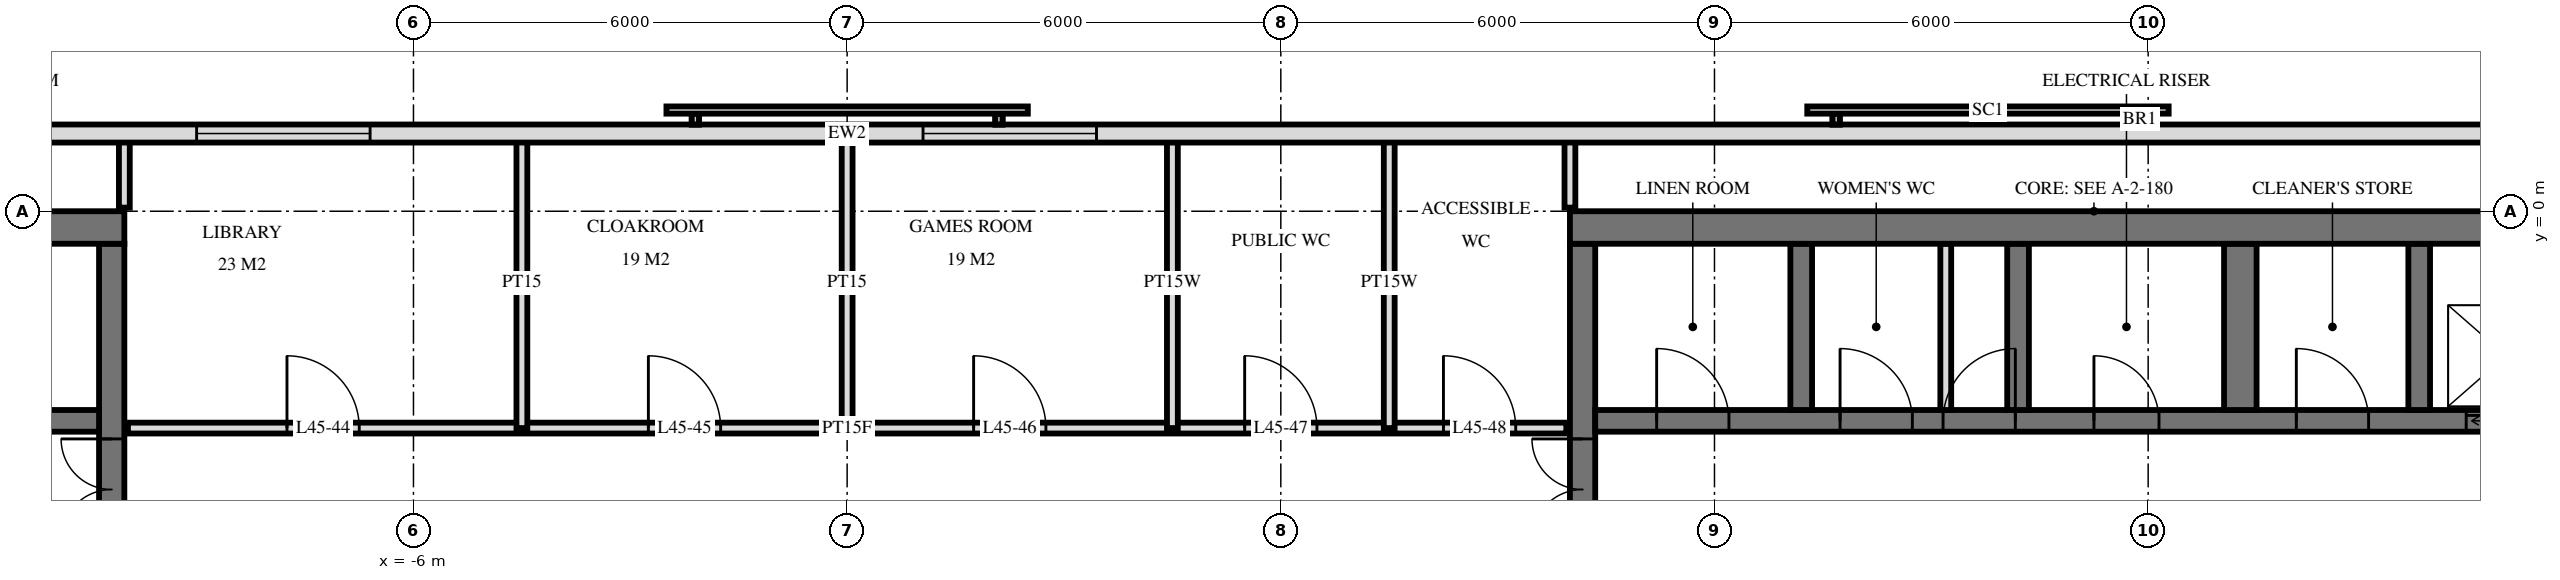
"""IFC4 building model, lengths in metres.
Left out: names, types, materials, properties, quantities, classifications, styles, units other than length and angle.
Written with IfcOpenShell. Run it as: python <this file> out.ifc"""

import sys

from ifc_helpers import new_model, si_unit, direction, frame, frame_2d, origin, place, context, subcontext, project, spatial, rectangle, extrude, element, fill, save


model = new_model("IFC4")
c1 = context("Model", 3, precision=1e-05, world=origin(), true_north=direction((0.0, 1.0)))
c2 = subcontext(c1, "Body", "Model", "MODEL_VIEW")
j1 = project(units=[si_unit("LENGTHUNIT", "METRE"), si_unit("PLANEANGLEUNIT", "RADIAN")], contexts=[c1])
p1 = place(None, origin())
s1 = spatial("IfcSite", under=j1, at=p1, CompositionType="ELEMENT")
p2 = place(p1, origin())
s2 = spatial("IfcBuilding", under=s1, at=p2, CompositionType="ELEMENT")
p3 = place(p2, frame((0.0, 0.0, 174.0)))
s3 = spatial("IfcBuildingStorey", under=s2, at=p3, CompositionType="ELEMENT", Elevation=174.0)
p4 = place(p3, frame((-24.5, -0.225, 0.0), z_axis=(0.0, 0.0, 1.0), x_axis=(1.0, 0.0, 0.0)))
e1 = element("IfcWall", 1, at=p4, inside=s3, PredefinedType="SHEAR", context=c2, shape_type="SweptSolid", body=[
    extrude(rectangle(XDim=14.5, YDim=0.45, at=frame_2d((7.25, 0.0))), origin(), (0.0, 0.0, 1.0), 3.6),
])
p5 = place(p3, frame((-10.175, -14.55, 0.0), z_axis=(0.0, 0.0, 1.0), x_axis=(0.0, 1.0, 0.0)))
e2 = element("IfcWall", 2, at=p5, inside=s3, PredefinedType="SHEAR", context=c2, shape_type="SweptSolid", body=[
    extrude(rectangle(XDim=14.1, YDim=0.35, at=frame_2d((7.05, 0.0))), origin(), (0.0, 0.0, 1.0), 3.6),
])
p6 = place(p5, frame((8.4, 0.0, 0.0)))
e3 = element("IfcOpeningElement", 3, at=p6, cuts=e2, PredefinedType="OPENING", context=c2, shape_type="SweptSolid", body=[
    extrude(rectangle(XDim=1.4, YDim=2.4, at=frame_2d((0.7, 1.2))), frame((0.0, 0.185, 0.0), z_axis=(0.0, -1.0, 0.0), x_axis=(1.0, 0.0, 0.0)), (0.0, 0.0, 1.0), 0.37),
])
p7 = place(p5, frame((10.0, 0.0, 0.0)))
e4 = element("IfcOpeningElement", 4, at=p7, cuts=e2, PredefinedType="OPENING", context=c2, shape_type="SweptSolid", body=[
    extrude(rectangle(XDim=1.4, YDim=2.4, at=frame_2d((0.7, 1.2))), frame((0.0, 0.185, 0.0), z_axis=(0.0, -1.0, 0.0), x_axis=(1.0, 0.0, 0.0)), (0.0, 0.0, 1.0), 0.37),
])
p8 = place(p5, frame((4.0, 0.0, 0.0)))
e5 = element("IfcOpeningElement", 5, at=p8, cuts=e2, PredefinedType="OPENING", context=c2, shape_type="SweptSolid", body=[
    extrude(rectangle(XDim=1.2, YDim=2.1, at=frame_2d((0.6, 1.05))), frame((0.0, 0.185, 0.0), z_axis=(0.0, -1.0, 0.0), x_axis=(1.0, 0.0, 0.0)), (0.0, 0.0, 1.0), 0.37),
])
p9 = place(p3, frame((-24.05, -2.9, 0.0), z_axis=(0.0, 0.0, 1.0), x_axis=(1.0, 0.0, 0.0)))
e6 = element("IfcWall", 6, at=p9, inside=s3, PredefinedType="SHEAR", context=c2, shape_type="SweptSolid", body=[
    extrude(rectangle(XDim=13.7, YDim=0.3, at=frame_2d((6.85, 0.0))), origin(), (0.0, 0.0, 1.0), 3.6),
])
p10 = place(p9, frame((0.55, 0.0, 0.0)))
e7 = element("IfcOpeningElement", 7, at=p10, cuts=e6, PredefinedType="OPENING", context=c2, shape_type="SweptSolid", body=[
    extrude(rectangle(XDim=1.1, YDim=2.1, at=frame_2d((0.55, 1.05))), frame((0.0, 0.16, 0.0), z_axis=(0.0, -1.0, 0.0), x_axis=(1.0, 0.0, 0.0)), (0.0, 0.0, 1.0), 0.32),
])
p11 = place(p9, frame((5.9, 0.0, 0.0)))
e8 = element("IfcOpeningElement", 8, at=p11, cuts=e6, PredefinedType="OPENING", context=c2, shape_type="SweptSolid", body=[
    extrude(rectangle(XDim=0.9, YDim=2.1, at=frame_2d((0.45, 1.05))), frame((0.0, 0.16, 0.0), z_axis=(0.0, -1.0, 0.0), x_axis=(1.0, 0.0, 0.0)), (0.0, 0.0, 1.0), 0.32),
])
p12 = place(p9, frame((11.85, 0.0, 0.0)))
e9 = element("IfcOpeningElement", 9, at=p12, cuts=e6, PredefinedType="OPENING", context=c2, shape_type="SweptSolid", body=[
    extrude(rectangle(XDim=1.0, YDim=2.1, at=frame_2d((0.5, 1.05))), frame((0.0, 0.16, 0.0), z_axis=(0.0, -1.0, 0.0), x_axis=(1.0, 0.0, 0.0)), (0.0, 0.0, 1.0), 0.32),
])
p13 = place(p9, frame((9.312, 0.0, 0.0)))
e10 = element("IfcOpeningElement", 10, at=p13, cuts=e6, PredefinedType="OPENING", context=c2, shape_type="SweptSolid", body=[
    extrude(rectangle(XDim=1.0, YDim=2.1, at=frame_2d((0.5, 1.05))), frame((0.0, 0.16, 0.0), z_axis=(0.0, -1.0, 0.0), x_axis=(1.0, 0.0, 0.0)), (0.0, 0.0, 1.0), 0.32),
])
p14 = place(p9, frame((7.887, 0.0, 0.0)))
e11 = element("IfcOpeningElement", 11, at=p14, cuts=e6, PredefinedType="OPENING", context=c2, shape_type="SweptSolid", body=[
    extrude(rectangle(XDim=1.0, YDim=2.1, at=frame_2d((0.5, 1.05))), frame((0.0, 0.16, 0.0), z_axis=(0.0, -1.0, 0.0), x_axis=(1.0, 0.0, 0.0)), (0.0, 0.0, 1.0), 0.32),
])
p15 = place(p9, frame((3.0, 0.0, 0.0)))
e12 = element("IfcOpeningElement", 12, at=p15, cuts=e6, PredefinedType="OPENING", context=c2, shape_type="SweptSolid", body=[
    extrude(rectangle(XDim=1.0, YDim=2.1, at=frame_2d((0.5, 1.05))), frame((0.0, 0.16, 0.0), z_axis=(0.0, -1.0, 0.0), x_axis=(1.0, 0.0, 0.0)), (0.0, 0.0, 1.0), 0.32),
])
p16 = place(p3, frame((10.0, -0.225, 0.0), z_axis=(0.0, 0.0, 1.0), x_axis=(1.0, 0.0, 0.0)))
e13 = element("IfcWall", 13, at=p16, inside=s3, PredefinedType="SHEAR", context=c2, shape_type="SweptSolid", body=[
    extrude(rectangle(XDim=14.5, YDim=0.45, at=frame_2d((7.25, 0.0))), origin(), (0.0, 0.0, 1.0), 3.6),
])
p17 = place(p3, frame((10.175, -14.55, 0.0), z_axis=(0.0, 0.0, 1.0), x_axis=(0.0, 1.0, 0.0)))
e14 = element("IfcWall", 14, at=p17, inside=s3, PredefinedType="SHEAR", context=c2, shape_type="SweptSolid", body=[
    extrude(rectangle(XDim=14.1, YDim=0.35, at=frame_2d((7.05, 0.0))), origin(), (0.0, 0.0, 1.0), 3.6),
])
p18 = place(p17, frame((8.4, 0.0, 0.0)))
e15 = element("IfcOpeningElement", 15, at=p18, cuts=e14, PredefinedType="OPENING", context=c2, shape_type="SweptSolid", body=[
    extrude(rectangle(XDim=1.4, YDim=2.4, at=frame_2d((0.7, 1.2))), frame((0.0, 0.185, 0.0), z_axis=(0.0, -1.0, 0.0), x_axis=(1.0, 0.0, 0.0)), (0.0, 0.0, 1.0), 0.37),
])
p19 = place(p17, frame((10.0, 0.0, 0.0)))
e16 = element("IfcOpeningElement", 16, at=p19, cuts=e14, PredefinedType="OPENING", context=c2, shape_type="SweptSolid", body=[
    extrude(rectangle(XDim=1.4, YDim=2.4, at=frame_2d((0.7, 1.2))), frame((0.0, 0.185, 0.0), z_axis=(0.0, -1.0, 0.0), x_axis=(1.0, 0.0, 0.0)), (0.0, 0.0, 1.0), 0.37),
])
p20 = place(p17, frame((4.0, 0.0, 0.0)))
e17 = element("IfcOpeningElement", 17, at=p20, cuts=e14, PredefinedType="OPENING", context=c2, shape_type="SweptSolid", body=[
    extrude(rectangle(XDim=1.2, YDim=2.1, at=frame_2d((0.6, 1.05))), frame((0.0, 0.185, 0.0), z_axis=(0.0, -1.0, 0.0), x_axis=(1.0, 0.0, 0.0)), (0.0, 0.0, 1.0), 0.37),
])
p21 = place(p3, frame((10.35, -2.9, 0.0), z_axis=(0.0, 0.0, 1.0), x_axis=(1.0, 0.0, 0.0)))
e18 = element("IfcWall", 18, at=p21, inside=s3, PredefinedType="SHEAR", context=c2, shape_type="SweptSolid", body=[
    extrude(rectangle(XDim=13.7, YDim=0.3, at=frame_2d((6.85, 0.0))), origin(), (0.0, 0.0, 1.0), 3.6),
])
p22 = place(p21, frame((12.05, 0.0, 0.0)))
e19 = element("IfcOpeningElement", 19, at=p22, cuts=e18, PredefinedType="OPENING", context=c2, shape_type="SweptSolid", body=[
    extrude(rectangle(XDim=1.1, YDim=2.1, at=frame_2d((0.55, 1.05))), frame((0.0, 0.16, 0.0), z_axis=(0.0, -1.0, 0.0), x_axis=(1.0, 0.0, 0.0)), (0.0, 0.0, 1.0), 0.32),
])
p23 = place(p21, frame((6.9, 0.0, 0.0)))
e20 = element("IfcOpeningElement", 20, at=p23, cuts=e18, PredefinedType="OPENING", context=c2, shape_type="SweptSolid", body=[
    extrude(rectangle(XDim=0.9, YDim=2.1, at=frame_2d((0.45, 1.05))), frame((0.0, 0.16, 0.0), z_axis=(0.0, -1.0, 0.0), x_axis=(1.0, 0.0, 0.0)), (0.0, 0.0, 1.0), 0.32),
])
p24 = place(p21, frame((0.85, 0.0, 0.0)))
e21 = element("IfcOpeningElement", 21, at=p24, cuts=e18, PredefinedType="OPENING", context=c2, shape_type="SweptSolid", body=[
    extrude(rectangle(XDim=1.0, YDim=2.1, at=frame_2d((0.5, 1.05))), frame((0.0, 0.16, 0.0), z_axis=(0.0, -1.0, 0.0), x_axis=(1.0, 0.0, 0.0)), (0.0, 0.0, 1.0), 0.32),
])
p25 = place(p21, frame((3.387, 0.0, 0.0)))
e22 = element("IfcOpeningElement", 22, at=p25, cuts=e18, PredefinedType="OPENING", context=c2, shape_type="SweptSolid", body=[
    extrude(rectangle(XDim=1.0, YDim=2.1, at=frame_2d((0.5, 1.05))), frame((0.0, 0.16, 0.0), z_axis=(0.0, -1.0, 0.0), x_axis=(1.0, 0.0, 0.0)), (0.0, 0.0, 1.0), 0.32),
])
p26 = place(p21, frame((4.812, 0.0, 0.0)))
e23 = element("IfcOpeningElement", 23, at=p26, cuts=e18, PredefinedType="OPENING", context=c2, shape_type="SweptSolid", body=[
    extrude(rectangle(XDim=1.0, YDim=2.1, at=frame_2d((0.5, 1.05))), frame((0.0, 0.16, 0.0), z_axis=(0.0, -1.0, 0.0), x_axis=(1.0, 0.0, 0.0)), (0.0, 0.0, 1.0), 0.32),
])
p27 = place(p21, frame((9.7, 0.0, 0.0)))
e24 = element("IfcOpeningElement", 24, at=p27, cuts=e18, PredefinedType="OPENING", context=c2, shape_type="SweptSolid", body=[
    extrude(rectangle(XDim=1.0, YDim=2.1, at=frame_2d((0.5, 1.05))), frame((0.0, 0.16, 0.0), z_axis=(0.0, -1.0, 0.0), x_axis=(1.0, 0.0, 0.0)), (0.0, 0.0, 1.0), 0.32),
])
for number, where, z_axis, x_axis in (
    (25, (13.2, -2.75, 0.0), (0.0, 0.0, 1.0), (0.0, 1.0, 0.0)),
    (26, (16.2, -2.75, 0.0), (0.0, 0.0, 1.0), (0.0, 1.0, 0.0)),
):
    element("IfcWall", number, at=place(p3, frame(where, z_axis=z_axis, x_axis=x_axis)), inside=s3, PredefinedType="SHEAR", context=c2, shape_type="SweptSolid", body=[
        extrude(rectangle(XDim=2.3, YDim=0.3, at=frame_2d((1.15, 0.0))), origin(), (0.0, 0.0, 1.0), 3.6),
    ])
p28 = place(p3, frame((19.275, -2.75, 0.0), z_axis=(0.0, 0.0, 1.0), x_axis=(0.0, 1.0, 0.0)))
e27 = element("IfcWall", 27, at=p28, inside=s3, PredefinedType="SHEAR", context=c2, shape_type="SweptSolid", body=[
    extrude(rectangle(XDim=2.3, YDim=0.45, at=frame_2d((1.15, 0.0))), origin(), (0.0, 0.0, 1.0), 3.6),
])
p29 = place(p3, frame((21.75, -2.75, 0.0), z_axis=(0.0, 0.0, 1.0), x_axis=(0.0, 1.0, 0.0)))
e28 = element("IfcWall", 28, at=p29, inside=s3, PredefinedType="SHEAR", context=c2, shape_type="SweptSolid", body=[
    extrude(rectangle(XDim=2.3, YDim=0.3, at=frame_2d((1.15, 0.0))), origin(), (0.0, 0.0, 1.0), 3.6),
])
p30 = place(p3, frame((23.675, 1.075, 0.0), z_axis=(0.0, 0.0, 1.0), x_axis=(-1.0, 0.0, 0.0)))
e29 = element("IfcWall", 29, at=p30, inside=s3, PredefinedType="SOLIDWALL", context=c2, shape_type="SweptSolid", body=[
    extrude(rectangle(XDim=47.351, YDim=0.25, at=frame_2d((23.675, 0.0))), origin(), (0.0, 0.0, 1.0), 3.3),
])
p31 = place(p30, frame((20.225, 0.0, 0.3)))
e30 = element("IfcOpeningElement", 30, at=p31, cuts=e29, PredefinedType="OPENING", context=c2, shape_type="SweptSolid", body=[
    extrude(rectangle(XDim=2.4, YDim=2.1, at=frame_2d((1.2, 1.05))), frame((0.0, 0.135, 0.0), z_axis=(0.0, -1.0, 0.0), x_axis=(1.0, 0.0, 0.0)), (0.0, 0.0, 1.0), 0.27),
])
p32 = place(p30, frame((30.275, 0.0, 0.3)))
e31 = element("IfcOpeningElement", 31, at=p32, cuts=e29, PredefinedType="OPENING", context=c2, shape_type="SweptSolid", body=[
    extrude(rectangle(XDim=2.4, YDim=2.1, at=frame_2d((1.2, 1.05))), frame((0.0, 0.135, 0.0), z_axis=(0.0, -1.0, 0.0), x_axis=(1.0, 0.0, 0.0)), (0.0, 0.0, 1.0), 0.27),
])
p33 = place(p3, frame((15.2, -2.75, 0.0), z_axis=(0.0, 0.0, 1.0), x_axis=(0.0, 1.0, 0.0)))
e32 = element("IfcWall", 32, at=p33, inside=s3, PredefinedType="PARTITIONING", context=c2, shape_type="SweptSolid", body=[
    extrude(rectangle(XDim=2.3, YDim=0.15, at=frame_2d((1.15, 0.0))), origin(), (0.0, 0.0, 1.0), 3.3),
])
p34 = place(p3, frame((10.0, 0.05, 0.0), z_axis=(0.0, 0.0, 1.0), x_axis=(0.0, 1.0, 0.0)))
e33 = element("IfcWall", 33, at=p34, inside=s3, PredefinedType="PLUMBINGWALL", context=c2, shape_type="SweptSolid", body=[
    extrude(rectangle(XDim=0.97, YDim=0.15, at=frame_2d((0.485, 0.0))), origin(), (0.0, 0.0, 1.0), 3.32),
])
for number, where, z_axis, x_axis in (
    (34, (7.5, -3.0, 0.0), (0.0, 0.0, 1.0), (0.0, 1.0, 0.0)),
    (35, (4.5, -3.0, 0.0), (0.0, 0.0, 1.0), (0.0, 1.0, 0.0)),
):
    element("IfcWall", number, at=place(p3, frame(where, z_axis=z_axis, x_axis=x_axis)), inside=s3, PredefinedType="PLUMBINGWALL", context=c2, shape_type="SweptSolid", body=[
        extrude(rectangle(XDim=4.02, YDim=0.15, at=frame_2d((2.01, 0.0))), origin(), (0.0, 0.0, 1.0), 3.32),
    ])
for number, where, z_axis, x_axis in (
    (36, (0.0, -3.0, 0.0), (0.0, 0.0, 1.0), (0.0, 1.0, 0.0)),
    (37, (-4.5, -3.0, 0.0), (0.0, 0.0, 1.0), (0.0, 1.0, 0.0)),
):
    element("IfcWall", number, at=place(p3, frame(where, z_axis=z_axis, x_axis=x_axis)), inside=s3, PredefinedType="PARTITIONING", context=c2, shape_type="SweptSolid", body=[
        extrude(rectangle(XDim=4.02, YDim=0.15, at=frame_2d((2.01, 0.0))), origin(), (0.0, 0.0, 1.0), 3.32),
    ])
p35 = place(p3, frame((-10.0, 0.05, 0.0), z_axis=(0.0, 0.0, 1.0), x_axis=(0.0, 1.0, 0.0)))
e38 = element("IfcWall", 38, at=p35, inside=s3, PredefinedType="PARTITIONING", context=c2, shape_type="SweptSolid", body=[
    extrude(rectangle(XDim=0.97, YDim=0.15, at=frame_2d((0.485, 0.0))), origin(), (0.0, 0.0, 1.0), 3.32),
])
p36 = place(p3, frame((-9.95, -3.0, 0.0), z_axis=(0.0, 0.0, 1.0), x_axis=(1.0, 0.0, 0.0)))
e39 = element("IfcWall", 39, at=p36, inside=s3, PredefinedType="PARTITIONING", context=c2, shape_type="SweptSolid", body=[
    extrude(rectangle(XDim=19.9, YDim=0.15, at=frame_2d((9.95, 0.0))), origin(), (0.0, 0.0, 1.0), 3.32),
])
p37 = place(p36, frame((2.2, 0.0, 0.0)))
e40 = element("IfcOpeningElement", 40, at=p37, cuts=e39, PredefinedType="OPENING", context=c2, shape_type="SweptSolid", body=[
    extrude(rectangle(XDim=1.0, YDim=2.1, at=frame_2d((0.5, 1.05))), frame((0.0, 0.085, 0.0), z_axis=(0.0, -1.0, 0.0), x_axis=(1.0, 0.0, 0.0)), (0.0, 0.0, 1.0), 0.17),
])
p38 = place(p36, frame((7.2, 0.0, 0.0)))
e41 = element("IfcOpeningElement", 41, at=p38, cuts=e39, PredefinedType="OPENING", context=c2, shape_type="SweptSolid", body=[
    extrude(rectangle(XDim=1.0, YDim=2.1, at=frame_2d((0.5, 1.05))), frame((0.0, 0.085, 0.0), z_axis=(0.0, -1.0, 0.0), x_axis=(1.0, 0.0, 0.0)), (0.0, 0.0, 1.0), 0.17),
])
p39 = place(p36, frame((11.7, 0.0, 0.0)))
e42 = element("IfcOpeningElement", 42, at=p39, cuts=e39, PredefinedType="OPENING", context=c2, shape_type="SweptSolid", body=[
    extrude(rectangle(XDim=1.0, YDim=2.1, at=frame_2d((0.5, 1.05))), frame((0.0, 0.085, 0.0), z_axis=(0.0, -1.0, 0.0), x_axis=(1.0, 0.0, 0.0)), (0.0, 0.0, 1.0), 0.17),
])
p40 = place(p36, frame((15.45, 0.0, 0.0)))
e43 = element("IfcOpeningElement", 43, at=p40, cuts=e39, PredefinedType="OPENING", context=c2, shape_type="SweptSolid", body=[
    extrude(rectangle(XDim=1.0, YDim=2.1, at=frame_2d((0.5, 1.05))), frame((0.0, 0.085, 0.0), z_axis=(0.0, -1.0, 0.0), x_axis=(1.0, 0.0, 0.0)), (0.0, 0.0, 1.0), 0.17),
])
p41 = place(p36, frame((18.2, 0.0, 0.0)))
e44 = element("IfcOpeningElement", 44, at=p41, cuts=e39, PredefinedType="OPENING", context=c2, shape_type="SweptSolid", body=[
    extrude(rectangle(XDim=1.0, YDim=2.1, at=frame_2d((0.5, 1.05))), frame((0.0, 0.085, 0.0), z_axis=(0.0, -1.0, 0.0), x_axis=(1.0, 0.0, 0.0)), (0.0, 0.0, 1.0), 0.17),
])
p42 = place(p31, origin())
e45 = element("IfcWindow", 45, at=p42, inside=s3, PartitioningType="SINGLE_PANEL", PredefinedType="WINDOW", context=c2, shape_type="SweptSolid", body=[
    extrude(rectangle(XDim=2.4, YDim=2.1, at=frame_2d((1.2, 1.05))), frame((0.0, 0.03, 0.0), z_axis=(0.0, -1.0, 0.0), x_axis=(1.0, 0.0, 0.0)), (0.0, 0.0, 1.0), 0.06),
])
fill(e30, e45)
p43 = place(p32, origin())
e46 = element("IfcWindow", 46, at=p43, inside=s3, PartitioningType="SINGLE_PANEL", PredefinedType="WINDOW", context=c2, shape_type="SweptSolid", body=[
    extrude(rectangle(XDim=2.4, YDim=2.1, at=frame_2d((1.2, 1.05))), frame((0.0, 0.03, 0.0), z_axis=(0.0, -1.0, 0.0), x_axis=(1.0, 0.0, 0.0)), (0.0, 0.0, 1.0), 0.06),
])
fill(e31, e46)
p44 = place(p22, origin())
e47 = element("IfcDoor", 47, at=p44, inside=s3, OperationType="DOUBLE_DOOR_SLIDING", PredefinedType="USERDEFINED", context=c2, shape_type="SweptSolid", body=[
    extrude(rectangle(XDim=1.1, YDim=2.1, at=frame_2d((0.55, 1.05))), frame((0.0, 0.025, 0.0), z_axis=(0.0, -1.0, 0.0), x_axis=(1.0, 0.0, 0.0)), (0.0, 0.0, 1.0), 0.05),
])
fill(e19, e47)
p45 = place(p7, origin())
e48 = element("IfcDoor", 48, at=p45, inside=s3, OperationType="DOUBLE_DOOR_SINGLE_SWING", PredefinedType="DOOR", context=c2, shape_type="SweptSolid", body=[
    extrude(rectangle(XDim=1.4, YDim=2.4, at=frame_2d((0.7, 1.2))), frame((0.0, 0.025, 0.0), z_axis=(0.0, -1.0, 0.0), x_axis=(1.0, 0.0, 0.0)), (0.0, 0.0, 1.0), 0.05),
])
fill(e4, e48)
p46 = place(p19, origin())
e49 = element("IfcDoor", 49, at=p46, inside=s3, OperationType="DOUBLE_DOOR_SINGLE_SWING", PredefinedType="DOOR", context=c2, shape_type="SweptSolid", body=[
    extrude(rectangle(XDim=1.4, YDim=2.4, at=frame_2d((0.7, 1.2))), frame((0.0, 0.025, 0.0), z_axis=(0.0, -1.0, 0.0), x_axis=(1.0, 0.0, 0.0)), (0.0, 0.0, 1.0), 0.05),
])
fill(e16, e49)
p47 = place(p23, origin())
e50 = element("IfcDoor", 50, at=p47, inside=s3, OperationType="SINGLE_SWING_RIGHT", PredefinedType="DOOR", context=c2, shape_type="SweptSolid", body=[
    extrude(rectangle(XDim=0.9, YDim=2.1, at=frame_2d((0.45, 1.05))), frame((0.0, 0.025, 0.0), z_axis=(0.0, -1.0, 0.0), x_axis=(1.0, 0.0, 0.0)), (0.0, 0.0, 1.0), 0.05),
])
fill(e20, e50)
p48 = place(p24, origin())
e51 = element("IfcDoor", 51, at=p48, inside=s3, OperationType="SINGLE_SWING_RIGHT", PredefinedType="DOOR", context=c2, shape_type="SweptSolid", body=[
    extrude(rectangle(XDim=1.0, YDim=2.1, at=frame_2d((0.5, 1.05))), frame((0.0, 0.025, 0.0), z_axis=(0.0, -1.0, 0.0), x_axis=(1.0, 0.0, 0.0)), (0.0, 0.0, 1.0), 0.05),
])
fill(e21, e51)
p49 = place(p25, origin())
e52 = element("IfcDoor", 52, at=p49, inside=s3, OperationType="SINGLE_SWING_RIGHT", PredefinedType="DOOR", context=c2, shape_type="SweptSolid", body=[
    extrude(rectangle(XDim=1.0, YDim=2.1, at=frame_2d((0.5, 1.05))), frame((0.0, 0.025, 0.0), z_axis=(0.0, -1.0, 0.0), x_axis=(1.0, 0.0, 0.0)), (0.0, 0.0, 1.0), 0.05),
])
fill(e22, e52)
p50 = place(p26, origin())
e53 = element("IfcDoor", 53, at=p50, inside=s3, OperationType="SINGLE_SWING_LEFT", PredefinedType="DOOR", context=c2, shape_type="SweptSolid", body=[
    extrude(rectangle(XDim=1.0, YDim=2.1, at=frame_2d((0.5, 1.05))), frame((0.0, 0.025, 0.0), z_axis=(0.0, -1.0, 0.0), x_axis=(1.0, 0.0, 0.0)), (0.0, 0.0, 1.0), 0.05),
])
fill(e23, e53)
p51 = place(p27, origin())
e54 = element("IfcDoor", 54, at=p51, inside=s3, OperationType="SINGLE_SWING_RIGHT", PredefinedType="DOOR", context=c2, shape_type="SweptSolid", body=[
    extrude(rectangle(XDim=1.0, YDim=2.1, at=frame_2d((0.5, 1.05))), frame((0.0, 0.025, 0.0), z_axis=(0.0, -1.0, 0.0), x_axis=(1.0, 0.0, 0.0)), (0.0, 0.0, 1.0), 0.05),
])
fill(e24, e54)
p52 = place(p37, origin())
e55 = element("IfcDoor", 55, at=p52, inside=s3, OperationType="SINGLE_SWING_RIGHT", PredefinedType="DOOR", context=c2, shape_type="SweptSolid", body=[
    extrude(rectangle(XDim=1.0, YDim=2.1, at=frame_2d((0.5, 1.05))), frame((0.0, 0.025, 0.0), z_axis=(0.0, -1.0, 0.0), x_axis=(1.0, 0.0, 0.0)), (0.0, 0.0, 1.0), 0.05),
])
fill(e40, e55)
p53 = place(p38, origin())
e56 = element("IfcDoor", 56, at=p53, inside=s3, OperationType="SINGLE_SWING_RIGHT", PredefinedType="DOOR", context=c2, shape_type="SweptSolid", body=[
    extrude(rectangle(XDim=1.0, YDim=2.1, at=frame_2d((0.5, 1.05))), frame((0.0, 0.025, 0.0), z_axis=(0.0, -1.0, 0.0), x_axis=(1.0, 0.0, 0.0)), (0.0, 0.0, 1.0), 0.05),
])
fill(e41, e56)
p54 = place(p39, origin())
e57 = element("IfcDoor", 57, at=p54, inside=s3, OperationType="SINGLE_SWING_RIGHT", PredefinedType="DOOR", context=c2, shape_type="SweptSolid", body=[
    extrude(rectangle(XDim=1.0, YDim=2.1, at=frame_2d((0.5, 1.05))), frame((0.0, 0.025, 0.0), z_axis=(0.0, -1.0, 0.0), x_axis=(1.0, 0.0, 0.0)), (0.0, 0.0, 1.0), 0.05),
])
fill(e42, e57)
p55 = place(p40, origin())
e58 = element("IfcDoor", 58, at=p55, inside=s3, OperationType="SINGLE_SWING_RIGHT", PredefinedType="DOOR", context=c2, shape_type="SweptSolid", body=[
    extrude(rectangle(XDim=1.0, YDim=2.1, at=frame_2d((0.5, 1.05))), frame((0.0, 0.025, 0.0), z_axis=(0.0, -1.0, 0.0), x_axis=(1.0, 0.0, 0.0)), (0.0, 0.0, 1.0), 0.05),
])
fill(e43, e58)
p56 = place(p41, origin())
e59 = element("IfcDoor", 59, at=p56, inside=s3, OperationType="SINGLE_SWING_RIGHT", PredefinedType="DOOR", context=c2, shape_type="SweptSolid", body=[
    extrude(rectangle(XDim=1.0, YDim=2.1, at=frame_2d((0.5, 1.05))), frame((0.0, 0.025, 0.0), z_axis=(0.0, -1.0, 0.0), x_axis=(1.0, 0.0, 0.0)), (0.0, 0.0, 1.0), 0.05),
])
fill(e44, e59)
save(model, sys.argv[1])
